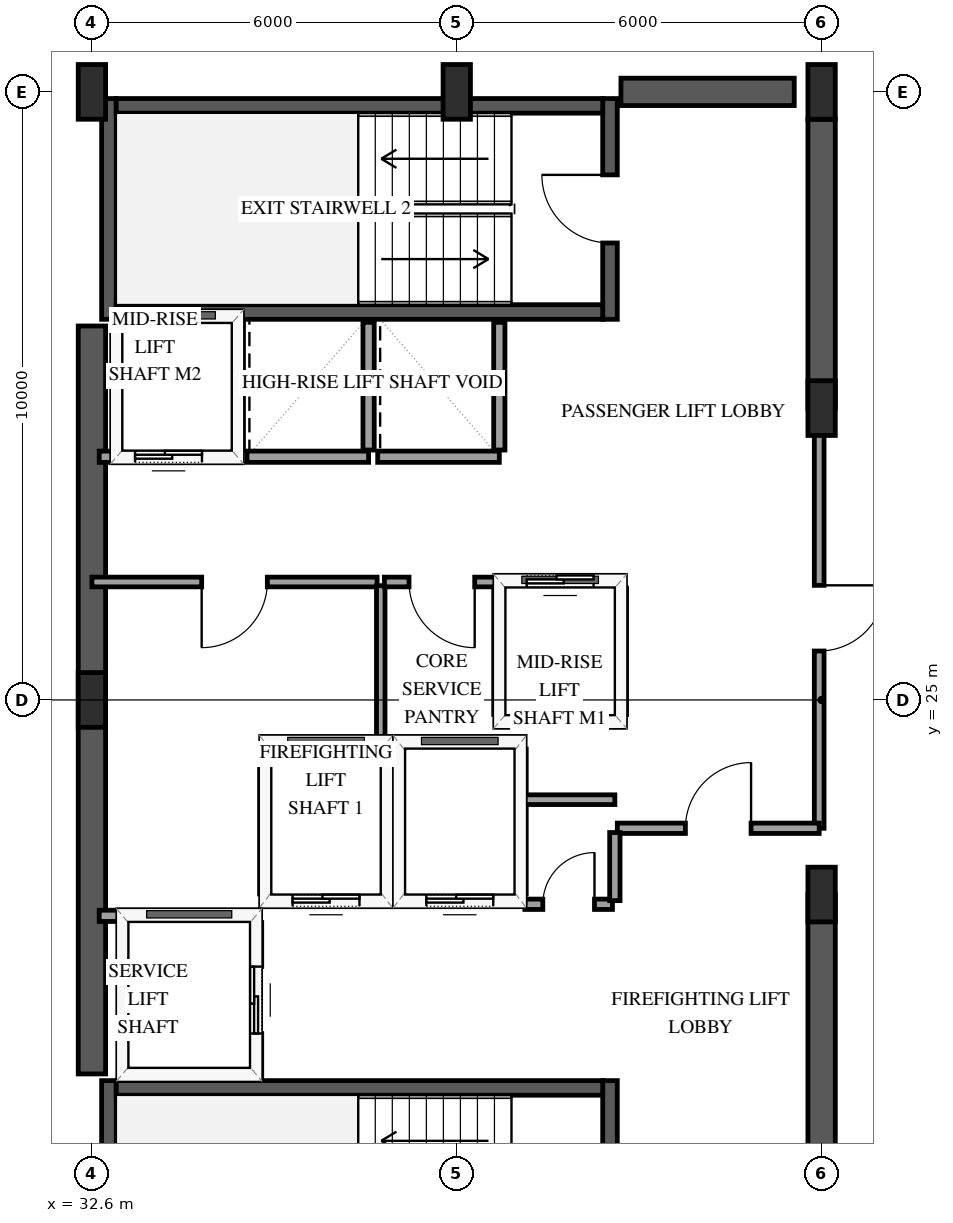
"""IFC4 building model, lengths in metres.
Left out: names, types, materials, properties, quantities, classifications, styles, units other than length and angle.
Written with IfcOpenShell. Run it as: python <this file> out.ifc"""

import sys

from ifc_helpers import new_model, si_unit, direction, frame, frame_2d, origin, origin_2d, place, context, subcontext, project, spatial, rectangle, extrude, element, fill, save


model = new_model("IFC4")
c1 = context("Model", 3, precision=1e-05, world=origin(), true_north=direction((0.0, 1.0)))
c2 = subcontext(c1, "Body", "Model", "MODEL_VIEW")
j1 = project(units=[si_unit("LENGTHUNIT", "METRE"), si_unit("PLANEANGLEUNIT", "RADIAN")], contexts=[c1])
p1 = place(None, origin())
s1 = spatial("IfcSite", under=j1, at=p1, CompositionType="ELEMENT")
p2 = place(p1, origin())
s2 = spatial("IfcBuilding", under=s1, at=p2, CompositionType="ELEMENT")
p3 = place(p2, frame((0.0, 0.0, 208.6)))
s3 = spatial("IfcBuildingStorey", under=s2, at=p3, CompositionType="ELEMENT", Elevation=208.6)
p4 = place(p3, frame((32.88, 15.11, 0.0), z_axis=(0.0, 0.0, 1.0), x_axis=(0.0, 1.0, 0.0)))
e1 = element("IfcWall", 1, at=p4, inside=s3, PredefinedType="SHEAR", context=c2, shape_type="SweptSolid", body=[
    extrude(rectangle(XDim=3.63, YDim=0.24, at=frame_2d((1.815, 0.0))), origin(), (0.0, 0.0, 1.0), 3.6),
])
p5 = place(p3, frame((41.12, 15.11, 0.0), z_axis=(0.0, 0.0, 1.0), x_axis=(0.0, 1.0, 0.0)))
e2 = element("IfcWall", 2, at=p5, inside=s3, PredefinedType="SHEAR", context=c2, shape_type="SweptSolid", body=[
    extrude(rectangle(XDim=3.63, YDim=0.24, at=frame_2d((1.815, 0.0))), origin(), (0.0, 0.0, 1.0), 3.6),
])
p6 = place(p5, frame((1.255, 0.0, 0.0)))
e3 = element("IfcOpeningElement", 3, at=p6, cuts=e2, PredefinedType="OPENING", context=c2, shape_type="SweptSolid", body=[
    extrude(rectangle(XDim=1.12, YDim=2.15, at=frame_2d((0.56, 1.075))), frame((0.0, 0.13, 0.0), z_axis=(0.0, -1.0, 0.0), x_axis=(1.0, 0.0, 0.0)), (0.0, 0.0, 1.0), 0.26),
])
p7 = place(p3, frame((33.0, 18.62, 0.0), z_axis=(0.0, 0.0, 1.0), x_axis=(1.0, 0.0, 0.0)))
e4 = element("IfcWall", 4, at=p7, inside=s3, PredefinedType="SHEAR", context=c2, shape_type="SweptSolid", body=[
    extrude(rectangle(XDim=8.0, YDim=0.24, at=frame_2d((4.0, 0.0))), origin(), (0.0, 0.0, 1.0), 3.6),
])
p8 = place(p3, frame((32.88, 31.26, 0.0), z_axis=(0.0, 0.0, 1.0), x_axis=(0.0, 1.0, 0.0)))
e5 = element("IfcWall", 5, at=p8, inside=s3, PredefinedType="SHEAR", context=c2, shape_type="SweptSolid", body=[
    extrude(rectangle(XDim=3.63, YDim=0.24, at=frame_2d((1.815, 0.0))), origin(), (0.0, 0.0, 1.0), 3.6),
])
p9 = place(p3, frame((41.12, 31.26, 0.0), z_axis=(0.0, 0.0, 1.0), x_axis=(0.0, 1.0, 0.0)))
e6 = element("IfcWall", 6, at=p9, inside=s3, PredefinedType="SHEAR", context=c2, shape_type="SweptSolid", body=[
    extrude(rectangle(XDim=3.63, YDim=0.24, at=frame_2d((1.815, 0.0))), origin(), (0.0, 0.0, 1.0), 3.6),
])
p10 = place(p9, frame((1.255, 0.0, 0.0)))
e7 = element("IfcOpeningElement", 7, at=p10, cuts=e6, PredefinedType="OPENING", context=c2, shape_type="SweptSolid", body=[
    extrude(rectangle(XDim=1.12, YDim=2.15, at=frame_2d((0.56, 1.075))), frame((0.0, 0.13, 0.0), z_axis=(0.0, -1.0, 0.0), x_axis=(1.0, 0.0, 0.0)), (0.0, 0.0, 1.0), 0.26),
])
for number, where, z_axis, x_axis in (
    (8, (33.0, 31.38, 0.0), (0.0, 0.0, 1.0), (1.0, 0.0, 0.0)),
    (9, (33.0, 34.77, 0.0), (0.0, 0.0, 1.0), (1.0, 0.0, 0.0)),
):
    element("IfcWall", number, at=place(p3, frame(where, z_axis=z_axis, x_axis=x_axis)), inside=s3, PredefinedType="SHEAR", context=c2, shape_type="SweptSolid", body=[
        extrude(rectangle(XDim=8.0, YDim=0.24, at=frame_2d((4.0, 0.0))), origin(), (0.0, 0.0, 1.0), 3.6),
    ])
p11 = place(p3, frame((32.6, 18.85, 0.0), z_axis=(0.0, 0.0, 1.0), x_axis=(0.0, 1.0, 0.0)))
e10 = element("IfcWall", 10, at=p11, inside=s3, PredefinedType="SHEAR", context=c2, shape_type="SweptSolid", body=[
    extrude(rectangle(XDim=12.3, YDim=0.45, at=frame_2d((6.15, 0.0))), origin(), (0.0, 0.0, 1.0), 3.6),
])
p12 = place(p3, frame((41.3, 35.0, 0.0), z_axis=(0.0, 0.0, 1.0), x_axis=(1.0, 0.0, 0.0)))
e11 = element("IfcWall", 11, at=p12, inside=s3, PredefinedType="SHEAR", context=c2, shape_type="SweptSolid", body=[
    extrude(rectangle(XDim=2.85, YDim=0.45, at=frame_2d((1.425, 0.0))), origin(), (0.0, 0.0, 1.0), 3.6),
])
p13 = place(p3, frame((44.6, 15.45, 0.0), z_axis=(0.0, 0.0, 1.0), x_axis=(0.0, 1.0, 0.0)))
e12 = element("IfcWall", 12, at=p13, inside=s3, PredefinedType="SHEAR", context=c2, shape_type="SweptSolid", body=[
    extrude(rectangle(XDim=6.35, YDim=0.45, at=frame_2d((3.175, 0.0))), origin(), (0.0, 0.0, 1.0), 3.6),
])
p14 = place(p3, frame((44.6, 29.8, 0.0), z_axis=(0.0, 0.0, 1.0), x_axis=(0.0, 1.0, 0.0)))
e13 = element("IfcWall", 13, at=p14, inside=s3, PredefinedType="SHEAR", context=c2, shape_type="SweptSolid", body=[
    extrude(rectangle(XDim=4.75, YDim=0.45, at=frame_2d((2.375, 0.0))), origin(), (0.0, 0.0, 1.0), 3.6),
])
for number, where, z_axis, x_axis in (
    (14, (32.6, 25.0, 0.0), (0.0, 0.0, 1.0), (1.0, 0.0, 0.0)),
    (15, (32.6, 35.0, 0.0), (0.0, 0.0, 1.0), (1.0, 0.0, 0.0)),
    (16, (38.6, 35.0, 0.0), (0.0, 0.0, 1.0), (1.0, 0.0, 0.0)),
    (17, (44.6, 21.8, 0.0), (0.0, 0.0, 1.0), (1.0, 0.0, 0.0)),
    (18, (44.6, 29.8, 0.0), (0.0, 0.0, 1.0), (1.0, 0.0, 0.0)),
    (19, (44.6, 35.0, 0.0), (0.0, 0.0, 1.0), (1.0, 0.0, 0.0)),
):
    element("IfcColumn", number, at=place(p3, frame(where, z_axis=z_axis, x_axis=x_axis)), inside=s3, PredefinedType="PILASTER", context=c2, shape_type="SweptSolid", body=[
        extrude(rectangle(XDim=0.45, YDim=0.9, at=origin_2d()), origin(), (0.0, 0.0, 1.0), 3.6),
    ])
p15 = place(p3, frame((35.45, 21.7, 0.0), z_axis=(0.0, 0.0, 1.0), x_axis=(1.0, 0.0, 0.0)))
e20 = element("IfcWall", 20, at=p15, inside=s3, PredefinedType="SOLIDWALL", context=c2, shape_type="SweptSolid", body=[
    extrude(rectangle(XDim=2.0, YDim=0.185, at=frame_2d((1.0, 0.0))), origin(), (0.0, 0.0, 1.0), 3.3),
])
p16 = place(p15, frame((0.45, 0.0, 0.0)))
e21 = element("IfcOpeningElement", 21, at=p16, cuts=e20, PredefinedType="OPENING", context=c2, shape_type="SweptSolid", body=[
    extrude(rectangle(XDim=1.1, YDim=2.15, at=frame_2d((0.55, 1.075))), frame((0.0, 0.103, 0.0), z_axis=(0.0, -1.0, 0.0), x_axis=(1.0, 0.0, 0.0)), (0.0, 0.0, 1.0), 0.205),
])
p17 = place(p3, frame((35.45, 24.3, 0.0), z_axis=(0.0, 0.0, 1.0), x_axis=(1.0, 0.0, 0.0)))
e22 = element("IfcWall", 22, at=p17, inside=s3, PredefinedType="SOLIDWALL", context=c2, shape_type="SweptSolid", body=[
    extrude(rectangle(XDim=2.0, YDim=0.185, at=frame_2d((1.0, 0.0))), origin(), (0.0, 0.0, 1.0), 3.3),
])
for number, where, z_axis, x_axis in (
    (23, (35.45, 21.81, 0.0), (0.0, 0.0, 1.0), (0.0, 1.0, 0.0)),
    (24, (37.45, 21.81, 0.0), (0.0, 0.0, 1.0), (0.0, 1.0, 0.0)),
):
    element("IfcWall", number, at=place(p3, frame(where, z_axis=z_axis, x_axis=x_axis)), inside=s3, PredefinedType="SOLIDWALL", context=c2, shape_type="SweptSolid", body=[
        extrude(rectangle(XDim=2.38, YDim=0.185, at=frame_2d((1.19, 0.0))), origin(), (0.0, 0.0, 1.0), 3.3),
    ])
p18 = place(p3, frame((37.65, 21.7, 0.0), z_axis=(0.0, 0.0, 1.0), x_axis=(1.0, 0.0, 0.0)))
e25 = element("IfcWall", 25, at=p18, inside=s3, PredefinedType="SOLIDWALL", context=c2, shape_type="SweptSolid", body=[
    extrude(rectangle(XDim=2.0, YDim=0.185, at=frame_2d((1.0, 0.0))), origin(), (0.0, 0.0, 1.0), 3.3),
])
p19 = place(p18, frame((0.45, 0.0, 0.0)))
e26 = element("IfcOpeningElement", 26, at=p19, cuts=e25, PredefinedType="OPENING", context=c2, shape_type="SweptSolid", body=[
    extrude(rectangle(XDim=1.1, YDim=2.15, at=frame_2d((0.55, 1.075))), frame((0.0, 0.103, 0.0), z_axis=(0.0, -1.0, 0.0), x_axis=(1.0, 0.0, 0.0)), (0.0, 0.0, 1.0), 0.205),
])
p20 = place(p3, frame((37.65, 24.3, 0.0), z_axis=(0.0, 0.0, 1.0), x_axis=(1.0, 0.0, 0.0)))
e27 = element("IfcWall", 27, at=p20, inside=s3, PredefinedType="SOLIDWALL", context=c2, shape_type="SweptSolid", body=[
    extrude(rectangle(XDim=2.0, YDim=0.185, at=frame_2d((1.0, 0.0))), origin(), (0.0, 0.0, 1.0), 3.3),
])
p21 = place(p3, frame((39.65, 21.81, 0.0), z_axis=(0.0, 0.0, 1.0), x_axis=(0.0, 1.0, 0.0)))
e28 = element("IfcWall", 28, at=p21, inside=s3, PredefinedType="SOLIDWALL", context=c2, shape_type="SweptSolid", body=[
    extrude(rectangle(XDim=2.38, YDim=0.185, at=frame_2d((1.19, 0.0))), origin(), (0.0, 0.0, 1.0), 3.3),
])
p22 = place(p3, frame((32.72, 21.45, 0.0), z_axis=(0.0, 0.0, 1.0), x_axis=(1.0, 0.0, 0.0)))
e29 = element("IfcWall", 29, at=p22, inside=s3, PredefinedType="SOLIDWALL", context=c2, shape_type="SweptSolid", body=[
    extrude(rectangle(XDim=2.58, YDim=0.185, at=frame_2d((1.29, 0.0))), origin(), (0.0, 0.0, 1.0), 3.3),
])
p23 = place(p3, frame((35.3, 18.79, 0.0), z_axis=(0.0, 0.0, 1.0), x_axis=(0.0, 1.0, 0.0)))
e30 = element("IfcWall", 30, at=p23, inside=s3, PredefinedType="SOLIDWALL", context=c2, shape_type="SweptSolid", body=[
    extrude(rectangle(XDim=2.55, YDim=0.185, at=frame_2d((1.275, 0.0))), origin(), (0.0, 0.0, 1.0), 3.3),
])
p24 = place(p23, frame((0.725, 0.0, 0.0)))
e31 = element("IfcOpeningElement", 31, at=p24, cuts=e30, PredefinedType="OPENING", context=c2, shape_type="SweptSolid", body=[
    extrude(rectangle(XDim=1.1, YDim=2.15, at=frame_2d((0.55, 1.075))), frame((0.0, 0.103, 0.0), z_axis=(0.0, -1.0, 0.0), x_axis=(1.0, 0.0, 0.0)), (0.0, 0.0, 1.0), 0.205),
])
p25 = place(p3, frame((39.3, 24.65, 0.0), z_axis=(0.0, 0.0, 1.0), x_axis=(1.0, 0.0, 0.0)))
e32 = element("IfcWall", 32, at=p25, inside=s3, PredefinedType="SOLIDWALL", context=c2, shape_type="SweptSolid", body=[
    extrude(rectangle(XDim=2.0, YDim=0.185, at=frame_2d((1.0, 0.0))), origin(), (0.0, 0.0, 1.0), 3.3),
])
p26 = place(p3, frame((39.3, 26.95, 0.0), z_axis=(0.0, 0.0, 1.0), x_axis=(1.0, 0.0, 0.0)))
e33 = element("IfcWall", 33, at=p26, inside=s3, PredefinedType="SOLIDWALL", context=c2, shape_type="SweptSolid", body=[
    extrude(rectangle(XDim=2.0, YDim=0.185, at=frame_2d((1.0, 0.0))), origin(), (0.0, 0.0, 1.0), 3.3),
])
p27 = place(p26, frame((0.45, 0.0, 0.0)))
e34 = element("IfcOpeningElement", 34, at=p27, cuts=e33, PredefinedType="OPENING", context=c2, shape_type="SweptSolid", body=[
    extrude(rectangle(XDim=1.1, YDim=2.15, at=frame_2d((0.55, 1.075))), frame((0.0, 0.103, 0.0), z_axis=(0.0, -1.0, 0.0), x_axis=(1.0, 0.0, 0.0)), (0.0, 0.0, 1.0), 0.205),
])
for number, where, z_axis, x_axis in (
    (35, (39.3, 24.76, 0.0), (0.0, 0.0, 1.0), (0.0, 1.0, 0.0)),
    (36, (41.3, 24.76, 0.0), (0.0, 0.0, 1.0), (0.0, 1.0, 0.0)),
):
    element("IfcWall", number, at=place(p3, frame(where, z_axis=z_axis, x_axis=x_axis)), inside=s3, PredefinedType="SOLIDWALL", context=c2, shape_type="SweptSolid", body=[
        extrude(rectangle(XDim=2.08, YDim=0.185, at=frame_2d((1.04, 0.0))), origin(), (0.0, 0.0, 1.0), 3.3),
    ])
p28 = place(p3, frame((32.72, 29.0, 0.0), z_axis=(0.0, 0.0, 1.0), x_axis=(1.0, 0.0, 0.0)))
e37 = element("IfcWall", 37, at=p28, inside=s3, PredefinedType="SOLIDWALL", context=c2, shape_type="SweptSolid", body=[
    extrude(rectangle(XDim=2.28, YDim=0.185, at=frame_2d((1.14, 0.0))), origin(), (0.0, 0.0, 1.0), 3.3),
])
p29 = place(p28, frame((0.59, 0.0, 0.0)))
e38 = element("IfcOpeningElement", 38, at=p29, cuts=e37, PredefinedType="OPENING", context=c2, shape_type="SweptSolid", body=[
    extrude(rectangle(XDim=1.1, YDim=2.15, at=frame_2d((0.55, 1.075))), frame((0.0, 0.103, 0.0), z_axis=(0.0, -1.0, 0.0), x_axis=(1.0, 0.0, 0.0)), (0.0, 0.0, 1.0), 0.205),
])
p30 = place(p3, frame((35.0, 29.11, 0.0), z_axis=(0.0, 0.0, 1.0), x_axis=(0.0, 1.0, 0.0)))
e39 = element("IfcWall", 39, at=p30, inside=s3, PredefinedType="SOLIDWALL", context=c2, shape_type="SweptSolid", body=[
    extrude(rectangle(XDim=2.1, YDim=0.185, at=frame_2d((1.05, 0.0))), origin(), (0.0, 0.0, 1.0), 3.3),
])
p31 = place(p3, frame((35.15, 29.0, 0.0), z_axis=(0.0, 0.0, 1.0), x_axis=(1.0, 0.0, 0.0)))
e40 = element("IfcWall", 40, at=p31, inside=s3, PredefinedType="SOLIDWALL", context=c2, shape_type="SweptSolid", body=[
    extrude(rectangle(XDim=2.0, YDim=0.185, at=frame_2d((1.0, 0.0))), origin(), (0.0, 0.0, 1.0), 3.3),
])
p32 = place(p3, frame((37.15, 29.11, 0.0), z_axis=(0.0, 0.0, 1.0), x_axis=(0.0, 1.0, 0.0)))
e41 = element("IfcWall", 41, at=p32, inside=s3, PredefinedType="SOLIDWALL", context=c2, shape_type="SweptSolid", body=[
    extrude(rectangle(XDim=2.1, YDim=0.185, at=frame_2d((1.05, 0.0))), origin(), (0.0, 0.0, 1.0), 3.3),
])
p33 = place(p3, frame((37.3, 29.0, 0.0), z_axis=(0.0, 0.0, 1.0), x_axis=(1.0, 0.0, 0.0)))
e42 = element("IfcWall", 42, at=p33, inside=s3, PredefinedType="SOLIDWALL", context=c2, shape_type="SweptSolid", body=[
    extrude(rectangle(XDim=2.0, YDim=0.185, at=frame_2d((1.0, 0.0))), origin(), (0.0, 0.0, 1.0), 3.3),
])
p34 = place(p3, frame((39.3, 29.11, 0.0), z_axis=(0.0, 0.0, 1.0), x_axis=(0.0, 1.0, 0.0)))
e43 = element("IfcWall", 43, at=p34, inside=s3, PredefinedType="SOLIDWALL", context=c2, shape_type="SweptSolid", body=[
    extrude(rectangle(XDim=2.1, YDim=0.185, at=frame_2d((1.05, 0.0))), origin(), (0.0, 0.0, 1.0), 3.3),
])
p35 = place(p3, frame((44.56, 29.8, 0.0), z_axis=(0.0, 0.0, 1.0), x_axis=(0.0, -1.0, 0.0)))
e44 = element("IfcWall", 44, at=p35, inside=s3, PredefinedType="PARTITIONING", context=c2, shape_type="SweptSolid", body=[
    extrude(rectangle(XDim=6.91, YDim=0.16, at=frame_2d((3.455, 0.0))), origin(), (0.0, 0.0, 1.0), 2.34),
])
p36 = place(p35, frame((2.915, 0.0, 0.0)))
e45 = element("IfcOpeningElement", 45, at=p36, cuts=e44, PredefinedType="OPENING", context=c2, shape_type="SweptSolid", body=[
    extrude(rectangle(XDim=1.08, YDim=2.15, at=frame_2d((0.54, 1.075))), frame((0.0, 0.09, 0.0), z_axis=(0.0, -1.0, 0.0), x_axis=(1.0, 0.0, 0.0)), (0.0, 0.0, 1.0), 0.18),
])
p37 = place(p3, frame((37.29, 26.94, 0.0), z_axis=(0.0, 0.0, 1.0), x_axis=(-1.0, 0.0, 0.0)))
e46 = element("IfcWall", 46, at=p37, inside=s3, PredefinedType="PARTITIONING", context=c2, shape_type="SweptSolid", body=[
    extrude(rectangle(XDim=4.69, YDim=0.16, at=frame_2d((2.345, 0.0))), origin(), (0.0, 0.0, 1.0), 3.3),
])
p38 = place(p37, frame((1.805, 0.0, 0.0)))
e47 = element("IfcOpeningElement", 47, at=p38, cuts=e46, PredefinedType="OPENING", context=c2, shape_type="SweptSolid", body=[
    extrude(rectangle(XDim=1.08, YDim=2.15, at=frame_2d((0.54, 1.075))), frame((0.0, 0.09, 0.0), z_axis=(0.0, -1.0, 0.0), x_axis=(1.0, 0.0, 0.0)), (0.0, 0.0, 1.0), 0.18),
])
p39 = place(p3, frame((41.24, 22.89, 0.0), z_axis=(0.0, 0.0, 1.0), x_axis=(1.0, 0.0, 0.0)))
e48 = element("IfcWall", 48, at=p39, inside=s3, PredefinedType="PARTITIONING", context=c2, shape_type="SweptSolid", body=[
    extrude(rectangle(XDim=3.32, YDim=0.17, at=frame_2d((1.66, 0.0))), origin(), (0.0, 0.0, 1.0), 3.3),
])
p40 = place(p39, frame((1.12, 0.0, 0.0)))
e49 = element("IfcOpeningElement", 49, at=p40, cuts=e48, PredefinedType="OPENING", context=c2, shape_type="SweptSolid", body=[
    extrude(rectangle(XDim=1.08, YDim=2.15, at=frame_2d((0.54, 1.075))), frame((0.0, 0.095, 0.0), z_axis=(0.0, -1.0, 0.0), x_axis=(1.0, 0.0, 0.0)), (0.0, 0.0, 1.0), 0.19),
])
p41 = place(p3, frame((37.35, 26.88, 0.0), z_axis=(0.0, 0.0, 1.0), x_axis=(0.0, -1.0, 0.0)))
e50 = element("IfcWall", 50, at=p41, inside=s3, PredefinedType="PARTITIONING", context=c2, shape_type="SweptSolid", body=[
    extrude(rectangle(XDim=2.58, YDim=0.14, at=frame_2d((1.29, 0.0))), origin(), (0.0, 0.0, 1.0), 3.3),
])
p42 = place(p3, frame((39.3, 26.94, 0.0), z_axis=(0.0, 0.0, 1.0), x_axis=(-1.0, 0.0, 0.0)))
e51 = element("IfcWall", 51, at=p42, inside=s3, PredefinedType="PARTITIONING", context=c2, shape_type="SweptSolid", body=[
    extrude(rectangle(XDim=1.89, YDim=0.16, at=frame_2d((0.945, 0.0))), origin(), (0.0, 0.0, 1.0), 3.3),
])
p43 = place(p42, frame((0.405, 0.0, 0.0)))
e52 = element("IfcOpeningElement", 52, at=p43, cuts=e51, PredefinedType="OPENING", context=c2, shape_type="SweptSolid", body=[
    extrude(rectangle(XDim=1.08, YDim=2.15, at=frame_2d((0.54, 1.075))), frame((0.0, 0.09, 0.0), z_axis=(0.0, -1.0, 0.0), x_axis=(1.0, 0.0, 0.0)), (0.0, 0.0, 1.0), 0.18),
])
p44 = place(p3, frame((39.72, 21.64, 0.0), z_axis=(0.0, 0.0, 1.0), x_axis=(1.0, 0.0, 0.0)))
e53 = element("IfcWall", 53, at=p44, inside=s3, PredefinedType="PARTITIONING", context=c2, shape_type="SweptSolid", body=[
    extrude(rectangle(XDim=1.44, YDim=0.17, at=frame_2d((0.72, 0.0))), origin(), (0.0, 0.0, 1.0), 3.3),
])
p45 = place(p44, frame((0.295, 0.0, 0.0)))
e54 = element("IfcOpeningElement", 54, at=p45, cuts=e53, PredefinedType="OPENING", context=c2, shape_type="SweptSolid", body=[
    extrude(rectangle(XDim=0.85, YDim=2.1, at=frame_2d((0.425, 1.05))), frame((0.0, 0.095, 0.0), z_axis=(0.0, -1.0, 0.0), x_axis=(1.0, 0.0, 0.0)), (0.0, 0.0, 1.0), 0.19),
])
p46 = place(p3, frame((41.2, 21.7, 0.0), z_axis=(0.0, 0.0, 1.0), x_axis=(0.0, 1.0, 0.0)))
e55 = element("IfcWall", 55, at=p46, inside=s3, PredefinedType="PARTITIONING", context=c2, shape_type="SweptSolid", body=[
    extrude(rectangle(XDim=1.12, YDim=0.17, at=frame_2d((0.56, 0.0))), origin(), (0.0, 0.0, 1.0), 3.3),
])
p47 = place(p3, frame((41.2, 23.36, 0.0), z_axis=(0.0, 0.0, 1.0), x_axis=(-1.0, 0.0, 0.0)))
e56 = element("IfcWall", 56, at=p47, inside=s3, PredefinedType="PARTITIONING", context=c2, shape_type="SweptSolid", body=[
    extrude(rectangle(XDim=1.48, YDim=0.16, at=frame_2d((0.74, 0.0))), origin(), (0.0, 0.0, 1.0), 3.3),
])
p48 = place(p16, origin())
e57 = element("IfcDoor", 57, at=p48, inside=s3, OperationType="SLIDING_TO_LEFT", PredefinedType="DOOR", context=c2, shape_type="SweptSolid", body=[
    extrude(rectangle(XDim=1.1, YDim=2.15, at=frame_2d((0.55, 1.075))), frame((0.0, 0.025, 0.0), z_axis=(0.0, -1.0, 0.0), x_axis=(1.0, 0.0, 0.0)), (0.0, 0.0, 1.0), 0.05),
])
fill(e21, e57)
p49 = place(p19, origin())
e58 = element("IfcDoor", 58, at=p49, inside=s3, OperationType="SLIDING_TO_LEFT", PredefinedType="DOOR", context=c2, shape_type="SweptSolid", body=[
    extrude(rectangle(XDim=1.1, YDim=2.15, at=frame_2d((0.55, 1.075))), frame((0.0, 0.025, 0.0), z_axis=(0.0, -1.0, 0.0), x_axis=(1.0, 0.0, 0.0)), (0.0, 0.0, 1.0), 0.05),
])
fill(e26, e58)
p50 = place(p24, origin())
e59 = element("IfcDoor", 59, at=p50, inside=s3, OperationType="SLIDING_TO_LEFT", PredefinedType="DOOR", context=c2, shape_type="SweptSolid", body=[
    extrude(rectangle(XDim=1.1, YDim=2.15, at=frame_2d((0.55, 1.075))), frame((0.0, 0.025, 0.0), z_axis=(0.0, -1.0, 0.0), x_axis=(1.0, 0.0, 0.0)), (0.0, 0.0, 1.0), 0.05),
])
fill(e31, e59)
p51 = place(p27, origin())
e60 = element("IfcDoor", 60, at=p51, inside=s3, OperationType="SLIDING_TO_LEFT", PredefinedType="DOOR", context=c2, shape_type="SweptSolid", body=[
    extrude(rectangle(XDim=1.1, YDim=2.15, at=frame_2d((0.55, 1.075))), frame((0.0, 0.025, 0.0), z_axis=(0.0, -1.0, 0.0), x_axis=(1.0, 0.0, 0.0)), (0.0, 0.0, 1.0), 0.05),
])
fill(e34, e60)
p52 = place(p29, origin())
e61 = element("IfcDoor", 61, at=p52, inside=s3, OperationType="SLIDING_TO_LEFT", PredefinedType="DOOR", context=c2, shape_type="SweptSolid", body=[
    extrude(rectangle(XDim=1.1, YDim=2.15, at=frame_2d((0.55, 1.075))), frame((0.0, 0.025, 0.0), z_axis=(0.0, -1.0, 0.0), x_axis=(1.0, 0.0, 0.0)), (0.0, 0.0, 1.0), 0.05),
])
fill(e38, e61)
p53 = place(p10, origin())
e62 = element("IfcDoor", 62, at=p53, inside=s3, OperationType="SINGLE_SWING_RIGHT", PredefinedType="DOOR", context=c2, shape_type="SweptSolid", body=[
    extrude(rectangle(XDim=1.12, YDim=2.15, at=frame_2d((0.56, 1.075))), frame((0.0, 0.025, 0.0), z_axis=(0.0, -1.0, 0.0), x_axis=(1.0, 0.0, 0.0)), (0.0, 0.0, 1.0), 0.05),
])
fill(e7, e62)
p54 = place(p36, origin())
e63 = element("IfcDoor", 63, at=p54, inside=s3, OperationType="SINGLE_SWING_LEFT", PredefinedType="DOOR", context=c2, shape_type="SweptSolid", body=[
    extrude(rectangle(XDim=1.08, YDim=2.15, at=frame_2d((0.54, 1.075))), frame((0.0, 0.025, 0.0), z_axis=(0.0, -1.0, 0.0), x_axis=(1.0, 0.0, 0.0)), (0.0, 0.0, 1.0), 0.05),
])
fill(e45, e63)
p55 = place(p38, origin())
e64 = element("IfcDoor", 64, at=p55, inside=s3, OperationType="SINGLE_SWING_RIGHT", PredefinedType="DOOR", context=c2, shape_type="SweptSolid", body=[
    extrude(rectangle(XDim=1.08, YDim=2.15, at=frame_2d((0.54, 1.075))), frame((0.0, 0.025, 0.0), z_axis=(0.0, -1.0, 0.0), x_axis=(1.0, 0.0, 0.0)), (0.0, 0.0, 1.0), 0.05),
])
fill(e47, e64)
p56 = place(p40, origin())
e65 = element("IfcDoor", 65, at=p56, inside=s3, OperationType="SINGLE_SWING_RIGHT", PredefinedType="DOOR", context=c2, shape_type="SweptSolid", body=[
    extrude(rectangle(XDim=1.08, YDim=2.15, at=frame_2d((0.54, 1.075))), frame((0.0, 0.025, 0.0), z_axis=(0.0, -1.0, 0.0), x_axis=(1.0, 0.0, 0.0)), (0.0, 0.0, 1.0), 0.05),
])
fill(e49, e65)
p57 = place(p43, origin())
e66 = element("IfcDoor", 66, at=p57, inside=s3, OperationType="SINGLE_SWING_LEFT", PredefinedType="DOOR", context=c2, shape_type="SweptSolid", body=[
    extrude(rectangle(XDim=1.08, YDim=2.15, at=frame_2d((0.54, 1.075))), frame((0.0, 0.025, 0.0), z_axis=(0.0, -1.0, 0.0), x_axis=(1.0, 0.0, 0.0)), (0.0, 0.0, 1.0), 0.05),
])
fill(e52, e66)
p58 = place(p45, origin())
e67 = element("IfcDoor", 67, at=p58, inside=s3, OperationType="SINGLE_SWING_RIGHT", PredefinedType="DOOR", context=c2, shape_type="SweptSolid", body=[
    extrude(rectangle(XDim=0.85, YDim=2.1, at=frame_2d((0.425, 1.05))), frame((0.0, 0.025, 0.0), z_axis=(0.0, -1.0, 0.0), x_axis=(1.0, 0.0, 0.0)), (0.0, 0.0, 1.0), 0.05),
])
fill(e54, e67)
save(model, sys.argv[1])
